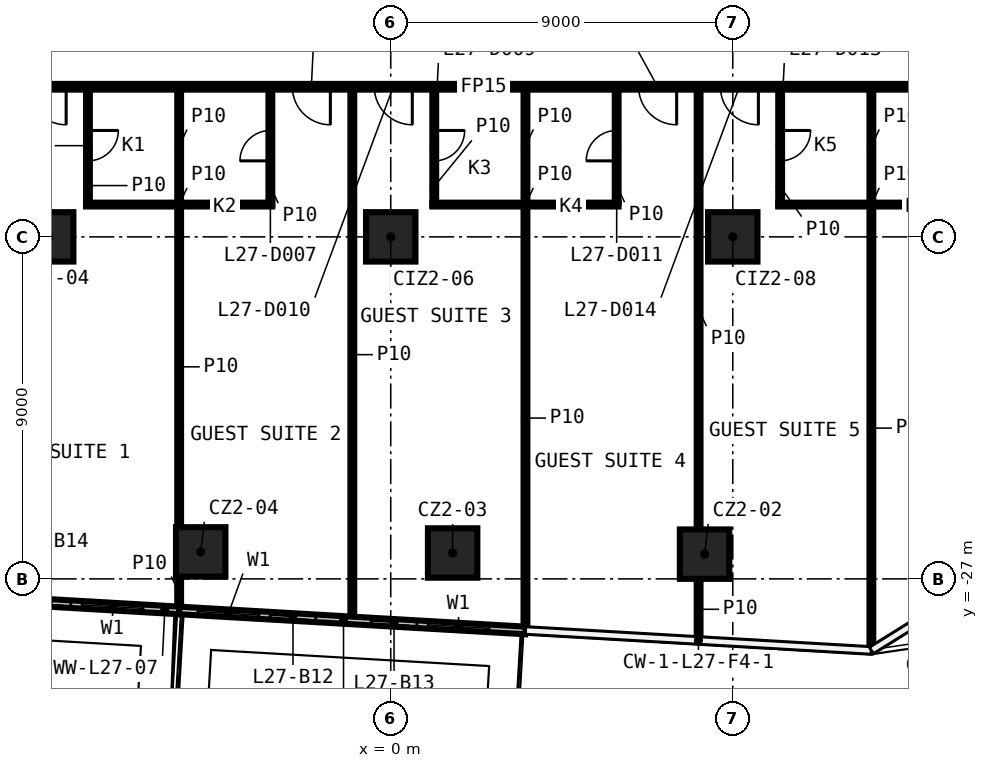
"""IFC4 building model, lengths in metres.
Left out: names, types, materials, properties, quantities, classifications, styles, units other than length and angle.
Written with IfcOpenShell. Run it as: python <this file> out.ifc"""

import sys

from ifc_helpers import new_model, si_unit, direction, frame, frame_2d, origin, origin_2d, place, context, subcontext, project, spatial, rectangle, extrude, element, fill, save


model = new_model("IFC4")
c1 = context("Model", 3, precision=1e-05, world=origin(), true_north=direction((0.0, 1.0)))
c2 = subcontext(c1, "Body", "Model", "MODEL_VIEW")
j1 = project(units=[si_unit("LENGTHUNIT", "METRE"), si_unit("PLANEANGLEUNIT", "RADIAN")], contexts=[c1])
p1 = place(None, origin())
s1 = spatial("IfcSite", under=j1, at=p1, CompositionType="ELEMENT")
p2 = place(p1, origin())
s2 = spatial("IfcBuilding", under=s1, at=p2, CompositionType="ELEMENT")
p3 = place(p2, frame((0.0, 0.0, 124.8)))
s3 = spatial("IfcBuildingStorey", under=s2, at=p3, CompositionType="ELEMENT", Elevation=124.8)
for number, where, z_axis, x_axis in (
    (1, (8.258, -26.349, 0.0), (0.0, 0.0, 1.0), (1.0, 0.0, 0.0)),
    (2, (1.629, -26.319, 0.0), (0.0, 0.0, 1.0), (1.0, 0.0, 0.0)),
    (3, (-5.0, -26.29, 0.0), (0.0, 0.0, 1.0), (1.0, 0.0, 0.0)),
    (4, (-9.0, -18.0, 0.0), (0.0, 0.0, 1.0), (1.0, 0.0, 0.0)),
    (5, (0.0, -18.0, 0.0), (0.0, 0.0, 1.0), (1.0, 0.0, 0.0)),
    (6, (9.0, -18.0, 0.0), (0.0, 0.0, 1.0), (1.0, 0.0, 0.0)),
):
    element("IfcColumn", number, at=place(p3, frame(where, z_axis=z_axis, x_axis=x_axis)), inside=s3, PredefinedType="COLUMN", context=c2, shape_type="SweptSolid", body=[
        extrude(rectangle(XDim=1.3, YDim=1.3, at=origin_2d()), origin(), (0.0, 0.0, 1.0), 3.3),
    ])
for number, where, z_axis, x_axis in (
    (7, (-8.017, -17.15, 0.0), (0.0, 0.0, 1.0), (1.0, 0.0, 0.0)),
    (8, (1.095, -17.15, 0.0), (0.0, 0.0, 1.0), (1.0, 0.0, 0.0)),
    (9, (10.197, -17.15, 0.0), (0.0, 0.0, 1.0), (1.0, 0.0, 0.0)),
):
    element("IfcWall", number, at=place(p3, frame(where, z_axis=z_axis, x_axis=x_axis)), inside=s3, PredefinedType="PARTITIONING", context=c2, shape_type="SweptSolid", body=[
        extrude(rectangle(XDim=4.9, YDim=0.1, at=frame_2d((2.45, 0.0))), origin(), (0.0, 0.0, 1.0), 3.3),
    ])
p4 = place(p3, frame((17.125, -14.05, 0.0), z_axis=(0.0, 0.0, 1.0), x_axis=(-1.0, 0.0, 0.0)))
e10 = element("IfcWall", 10, at=p4, inside=s3, PredefinedType="PARTITIONING", context=c2, shape_type="SweptSolid", body=[
    extrude(rectangle(XDim=34.25, YDim=0.15, at=frame_2d((17.125, 0.0))), origin(), (0.0, 0.0, 1.0), 3.3),
])
p5 = place(p4, frame((32.089, 0.0, 0.0)))
e11 = element("IfcOpeningElement", 11, at=p5, cuts=e10, PredefinedType="OPENING", context=c2, shape_type="SweptSolid", body=[
    extrude(rectangle(XDim=0.9, YDim=2.1, at=frame_2d((0.45, 1.05))), frame((0.0, 0.085, 0.0), z_axis=(0.0, -1.0, 0.0), x_axis=(1.0, 0.0, 0.0)), (0.0, 0.0, 1.0), 0.17),
])
p6 = place(p4, frame((25.666, 0.0, 0.0)))
e12 = element("IfcOpeningElement", 12, at=p6, cuts=e10, PredefinedType="OPENING", context=c2, shape_type="SweptSolid", body=[
    extrude(rectangle(XDim=1.0, YDim=2.1, at=frame_2d((0.5, 1.05))), frame((0.0, 0.085, 0.0), z_axis=(0.0, -1.0, 0.0), x_axis=(1.0, 0.0, 0.0)), (0.0, 0.0, 1.0), 0.17),
])
p7 = place(p4, frame((18.714, 0.0, 0.0)))
e13 = element("IfcOpeningElement", 13, at=p7, cuts=e10, PredefinedType="OPENING", context=c2, shape_type="SweptSolid", body=[
    extrude(rectangle(XDim=1.0, YDim=2.1, at=frame_2d((0.5, 1.05))), frame((0.0, 0.085, 0.0), z_axis=(0.0, -1.0, 0.0), x_axis=(1.0, 0.0, 0.0)), (0.0, 0.0, 1.0), 0.17),
])
p8 = place(p4, frame((16.558, 0.0, 0.0)))
e14 = element("IfcOpeningElement", 14, at=p8, cuts=e10, PredefinedType="OPENING", context=c2, shape_type="SweptSolid", body=[
    extrude(rectangle(XDim=1.0, YDim=2.1, at=frame_2d((0.5, 1.05))), frame((0.0, 0.085, 0.0), z_axis=(0.0, -1.0, 0.0), x_axis=(1.0, 0.0, 0.0)), (0.0, 0.0, 1.0), 0.17),
])
p9 = place(p4, frame((9.602, 0.0, 0.0)))
e15 = element("IfcOpeningElement", 15, at=p9, cuts=e10, PredefinedType="OPENING", context=c2, shape_type="SweptSolid", body=[
    extrude(rectangle(XDim=1.0, YDim=2.1, at=frame_2d((0.5, 1.05))), frame((0.0, 0.085, 0.0), z_axis=(0.0, -1.0, 0.0), x_axis=(1.0, 0.0, 0.0)), (0.0, 0.0, 1.0), 0.17),
])
p10 = place(p4, frame((7.451, 0.0, 0.0)))
e16 = element("IfcOpeningElement", 16, at=p10, cuts=e10, PredefinedType="OPENING", context=c2, shape_type="SweptSolid", body=[
    extrude(rectangle(XDim=1.0, YDim=2.1, at=frame_2d((0.5, 1.05))), frame((0.0, 0.085, 0.0), z_axis=(0.0, -1.0, 0.0), x_axis=(1.0, 0.0, 0.0)), (0.0, 0.0, 1.0), 0.17),
])
p11 = place(p4, frame((0.576, 0.0, 0.0)))
e17 = element("IfcOpeningElement", 17, at=p11, cuts=e10, PredefinedType="OPENING", context=c2, shape_type="SweptSolid", body=[
    extrude(rectangle(XDim=1.0, YDim=2.1, at=frame_2d((0.5, 1.05))), frame((0.0, 0.085, 0.0), z_axis=(0.0, -1.0, 0.0), x_axis=(1.0, 0.0, 0.0)), (0.0, 0.0, 1.0), 0.17),
])
p12 = place(p3, frame((12.647, -28.864, 0.0), z_axis=(0.0, 0.0, 1.0), x_axis=(0.0, 1.0, 0.0)))
e18 = element("IfcWall", 18, at=p12, inside=s3, PredefinedType="PARTITIONING", context=c2, shape_type="SweptSolid", body=[
    extrude(rectangle(XDim=11.664, YDim=0.1, at=frame_2d((5.832, 0.0))), origin(), (0.0, 0.0, 1.0), 3.3),
])
p13 = place(p3, frame((12.647, -17.1, 0.0), z_axis=(0.0, 0.0, 1.0), x_axis=(0.0, 1.0, 0.0)))
e19 = element("IfcWall", 19, at=p13, inside=s3, PredefinedType="PARTITIONING", context=c2, shape_type="SweptSolid", body=[
    extrude(rectangle(XDim=2.975, YDim=0.1, at=frame_2d((1.488, 0.0))), origin(), (0.0, 0.0, 1.0), 3.3),
])
p14 = place(p3, frame((10.247, -14.125, 0.0), z_axis=(0.0, 0.0, 1.0), x_axis=(0.0, -1.0, 0.0)))
e20 = element("IfcWall", 20, at=p14, inside=s3, PredefinedType="PARTITIONING", context=c2, shape_type="SweptSolid", body=[
    extrude(rectangle(XDim=3.025, YDim=0.1, at=frame_2d((1.512, 0.0))), origin(), (0.0, 0.0, 1.0), 3.3),
])
p15 = place(p14, frame((1.075, 0.0, 0.0)))
e21 = element("IfcOpeningElement", 21, at=p15, cuts=e20, PredefinedType="OPENING", context=c2, shape_type="SweptSolid", body=[
    extrude(rectangle(XDim=0.8, YDim=2.1, at=frame_2d((0.4, 1.05))), frame((0.0, 0.06, 0.0), z_axis=(0.0, -1.0, 0.0), x_axis=(1.0, 0.0, 0.0)), (0.0, 0.0, 1.0), 0.12),
])
p16 = place(p3, frame((8.101, -28.601, 0.0), z_axis=(0.0, 0.0, 1.0), x_axis=(0.0, 1.0, 0.0)))
e22 = element("IfcWall", 22, at=p16, inside=s3, PredefinedType="PARTITIONING", context=c2, shape_type="SweptSolid", body=[
    extrude(rectangle(XDim=1.602, YDim=0.1, at=frame_2d((0.801, 0.0))), origin(), (0.0, 0.0, 1.0), 3.3),
])
p17 = place(p3, frame((8.101, -25.699, 0.0), z_axis=(0.0, 0.0, 1.0), x_axis=(0.0, 1.0, 0.0)))
e23 = element("IfcWall", 23, at=p17, inside=s3, PredefinedType="PARTITIONING", context=c2, shape_type="SweptSolid", body=[
    extrude(rectangle(XDim=11.574, YDim=0.1, at=frame_2d((5.787, 0.0))), origin(), (0.0, 0.0, 1.0), 3.3),
])
p18 = place(p3, frame((5.945, -17.1, 0.0), z_axis=(0.0, 0.0, 1.0), x_axis=(0.0, 1.0, 0.0)))
e24 = element("IfcWall", 24, at=p18, inside=s3, PredefinedType="PARTITIONING", context=c2, shape_type="SweptSolid", body=[
    extrude(rectangle(XDim=2.975, YDim=0.1, at=frame_2d((1.488, 0.0))), origin(), (0.0, 0.0, 1.0), 3.3),
])
p19 = place(p18, frame((1.1, 0.0, 0.0)))
e25 = element("IfcOpeningElement", 25, at=p19, cuts=e24, PredefinedType="OPENING", context=c2, shape_type="SweptSolid", body=[
    extrude(rectangle(XDim=0.8, YDim=2.1, at=frame_2d((0.4, 1.05))), frame((0.0, 0.06, 0.0), z_axis=(0.0, -1.0, 0.0), x_axis=(1.0, 0.0, 0.0)), (0.0, 0.0, 1.0), 0.12),
])
p20 = place(p3, frame((3.545, -28.338, 0.0), z_axis=(0.0, 0.0, 1.0), x_axis=(0.0, 1.0, 0.0)))
e26 = element("IfcWall", 26, at=p20, inside=s3, PredefinedType="PARTITIONING", context=c2, shape_type="SweptSolid", body=[
    extrude(rectangle(XDim=11.138, YDim=0.1, at=frame_2d((5.569, 0.0))), origin(), (0.0, 0.0, 1.0), 3.3),
])
p21 = place(p3, frame((3.545, -17.1, 0.0), z_axis=(0.0, 0.0, 1.0), x_axis=(0.0, 1.0, 0.0)))
e27 = element("IfcWall", 27, at=p21, inside=s3, PredefinedType="PARTITIONING", context=c2, shape_type="SweptSolid", body=[
    extrude(rectangle(XDim=2.975, YDim=0.1, at=frame_2d((1.488, 0.0))), origin(), (0.0, 0.0, 1.0), 3.3),
])
p22 = place(p3, frame((1.145, -14.125, 0.0), z_axis=(0.0, 0.0, 1.0), x_axis=(0.0, -1.0, 0.0)))
e28 = element("IfcWall", 28, at=p22, inside=s3, PredefinedType="PARTITIONING", context=c2, shape_type="SweptSolid", body=[
    extrude(rectangle(XDim=3.025, YDim=0.1, at=frame_2d((1.512, 0.0))), origin(), (0.0, 0.0, 1.0), 3.3),
])
p23 = place(p22, frame((1.075, 0.0, 0.0)))
e29 = element("IfcOpeningElement", 29, at=p23, cuts=e28, PredefinedType="OPENING", context=c2, shape_type="SweptSolid", body=[
    extrude(rectangle(XDim=0.8, YDim=2.1, at=frame_2d((0.4, 1.05))), frame((0.0, 0.06, 0.0), z_axis=(0.0, -1.0, 0.0), x_axis=(1.0, 0.0, 0.0)), (0.0, 0.0, 1.0), 0.12),
])
p24 = place(p3, frame((-1.011, -28.074, 0.0), z_axis=(0.0, 0.0, 1.0), x_axis=(0.0, 1.0, 0.0)))
e30 = element("IfcWall", 30, at=p24, inside=s3, PredefinedType="PARTITIONING", context=c2, shape_type="SweptSolid", body=[
    extrude(rectangle(XDim=13.949, YDim=0.1, at=frame_2d((6.975, 0.0))), origin(), (0.0, 0.0, 1.0), 3.3),
])
p25 = place(p3, frame((-3.167, -17.15, 0.0), z_axis=(0.0, 0.0, 1.0), x_axis=(0.0, 1.0, 0.0)))
e31 = element("IfcWall", 31, at=p25, inside=s3, PredefinedType="PARTITIONING", context=c2, shape_type="SweptSolid", body=[
    extrude(rectangle(XDim=3.025, YDim=0.1, at=frame_2d((1.512, 0.0))), origin(), (0.0, 0.0, 1.0), 3.3),
])
p26 = place(p25, frame((1.15, 0.0, 0.0)))
e32 = element("IfcOpeningElement", 32, at=p26, cuts=e31, PredefinedType="OPENING", context=c2, shape_type="SweptSolid", body=[
    extrude(rectangle(XDim=0.8, YDim=2.1, at=frame_2d((0.4, 1.05))), frame((0.0, 0.06, 0.0), z_axis=(0.0, -1.0, 0.0), x_axis=(1.0, 0.0, 0.0)), (0.0, 0.0, 1.0), 0.12),
])
p27 = place(p3, frame((-5.567, -27.811, 0.0), z_axis=(0.0, 0.0, 1.0), x_axis=(0.0, 1.0, 0.0)))
e33 = element("IfcWall", 33, at=p27, inside=s3, PredefinedType="PARTITIONING", context=c2, shape_type="SweptSolid", body=[
    extrude(rectangle(XDim=0.871, YDim=0.1, at=frame_2d((0.435, 0.0))), origin(), (0.0, 0.0, 1.0), 3.3),
])
p28 = place(p3, frame((-5.567, -25.64, 0.0), z_axis=(0.0, 0.0, 1.0), x_axis=(0.0, 1.0, 0.0)))
e34 = element("IfcWall", 34, at=p28, inside=s3, PredefinedType="PARTITIONING", context=c2, shape_type="SweptSolid", body=[
    extrude(rectangle(XDim=8.44, YDim=0.1, at=frame_2d((4.22, 0.0))), origin(), (0.0, 0.0, 1.0), 3.3),
])
p29 = place(p3, frame((-5.567, -17.1, 0.0), z_axis=(0.0, 0.0, 1.0), x_axis=(0.0, 1.0, 0.0)))
e35 = element("IfcWall", 35, at=p29, inside=s3, PredefinedType="PARTITIONING", context=c2, shape_type="SweptSolid", body=[
    extrude(rectangle(XDim=2.975, YDim=0.1, at=frame_2d((1.488, 0.0))), origin(), (0.0, 0.0, 1.0), 3.3),
])
p30 = place(p3, frame((-7.967, -14.125, 0.0), z_axis=(0.0, 0.0, 1.0), x_axis=(0.0, -1.0, 0.0)))
e36 = element("IfcWall", 36, at=p30, inside=s3, PredefinedType="PARTITIONING", context=c2, shape_type="SweptSolid", body=[
    extrude(rectangle(XDim=2.975, YDim=0.1, at=frame_2d((1.488, 0.0))), origin(), (0.0, 0.0, 1.0), 3.3),
])
p31 = place(p30, frame((1.075, 0.0, 0.0)))
e37 = element("IfcOpeningElement", 37, at=p31, cuts=e36, PredefinedType="OPENING", context=c2, shape_type="SweptSolid", body=[
    extrude(rectangle(XDim=0.8, YDim=2.1, at=frame_2d((0.4, 1.05))), frame((0.0, 0.06, 0.0), z_axis=(0.0, -1.0, 0.0), x_axis=(1.0, 0.0, 0.0)), (0.0, 0.0, 1.0), 0.12),
])
p32 = place(p3, frame((-5.567, -27.831, 0.0), z_axis=(0.0, 0.0, 1.0), x_axis=(0.998331175274, -0.057748285484, 0.0)))
e38 = element("IfcWall", 38, at=p32, inside=s3, PredefinedType="SOLIDWALL", context=c2, shape_type="SweptSolid", body=[
    extrude(rectangle(XDim=9.127, YDim=0.2, at=frame_2d((4.564, 0.0))), origin(), (0.0, 0.0, 1.0), 3.3),
])
p33 = place(p32, frame((0.5, 0.0, 0.6)))
e39 = element("IfcOpeningElement", 39, at=p33, cuts=e38, PredefinedType="OPENING", context=c2, shape_type="SweptSolid", body=[
    extrude(rectangle(XDim=1.6, YDim=2.4, at=frame_2d((0.8, 1.2))), frame((0.0, 0.11, 0.0), z_axis=(0.0, -1.0, 0.0), x_axis=(1.0, 0.0, 0.0)), (0.0, 0.0, 1.0), 0.22),
])
p34 = place(p32, frame((2.4, 0.0, 0.0)))
e40 = element("IfcOpeningElement", 40, at=p34, cuts=e38, PredefinedType="OPENING", context=c2, shape_type="SweptSolid", body=[
    extrude(rectangle(XDim=1.2, YDim=2.4, at=frame_2d((0.6, 1.2))), frame((0.0, 0.11, 0.0), z_axis=(0.0, -1.0, 0.0), x_axis=(1.0, 0.0, 0.0)), (0.0, 0.0, 1.0), 0.22),
])
p35 = place(p32, frame((6.564, 0.0, 0.6)))
e41 = element("IfcOpeningElement", 41, at=p35, cuts=e38, PredefinedType="OPENING", context=c2, shape_type="SweptSolid", body=[
    extrude(rectangle(XDim=1.6, YDim=2.4, at=frame_2d((0.8, 1.2))), frame((0.0, 0.11, 0.0), z_axis=(0.0, -1.0, 0.0), x_axis=(1.0, 0.0, 0.0)), (0.0, 0.0, 1.0), 0.22),
])
p36 = place(p32, frame((5.064, 0.0, 0.0)))
e42 = element("IfcOpeningElement", 42, at=p36, cuts=e38, PredefinedType="OPENING", context=c2, shape_type="SweptSolid", body=[
    extrude(rectangle(XDim=1.2, YDim=2.4, at=frame_2d((0.6, 1.2))), frame((0.0, 0.11, 0.0), z_axis=(0.0, -1.0, 0.0), x_axis=(1.0, 0.0, 0.0)), (0.0, 0.0, 1.0), 0.22),
])
p37 = place(p3, frame((-10.115, -27.568, 0.0), z_axis=(0.0, 0.0, 1.0), x_axis=(0.998332643992, -0.057722889224, 0.0)))
e43 = element("IfcWall", 43, at=p37, inside=s3, PredefinedType="SOLIDWALL", context=c2, shape_type="SweptSolid", body=[
    extrude(rectangle(XDim=4.555, YDim=0.2, at=frame_2d((2.278, 0.0))), origin(), (0.0, 0.0, 1.0), 3.3),
])
p38 = place(p37, frame((2.0, 0.0, 0.6)))
e44 = element("IfcOpeningElement", 44, at=p38, cuts=e43, PredefinedType="OPENING", context=c2, shape_type="SweptSolid", body=[
    extrude(rectangle(XDim=1.6, YDim=2.4, at=frame_2d((0.8, 1.2))), frame((0.0, 0.11, 0.0), z_axis=(0.0, -1.0, 0.0), x_axis=(1.0, 0.0, 0.0)), (0.0, 0.0, 1.0), 0.22),
])
p39 = place(p37, frame((0.5, 0.0, 0.0)))
e45 = element("IfcOpeningElement", 45, at=p39, cuts=e43, PredefinedType="OPENING", context=c2, shape_type="SweptSolid", body=[
    extrude(rectangle(XDim=1.2, YDim=2.4, at=frame_2d((0.6, 1.2))), frame((0.0, 0.11, 0.0), z_axis=(0.0, -1.0, 0.0), x_axis=(1.0, 0.0, 0.0)), (0.0, 0.0, 1.0), 0.22),
])
p40 = place(p31, origin())
e46 = element("IfcDoor", 46, at=p40, inside=s3, OperationType="SINGLE_SWING_RIGHT", PredefinedType="DOOR", context=c2, shape_type="SweptSolid", body=[
    extrude(rectangle(XDim=0.8, YDim=2.1, at=frame_2d((0.4, 1.05))), frame((0.0, 0.025, 0.0), z_axis=(0.0, -1.0, 0.0), x_axis=(1.0, 0.0, 0.0)), (0.0, 0.0, 1.0), 0.05),
])
fill(e37, e46)
p41 = place(p6, origin())
e47 = element("IfcDoor", 47, at=p41, inside=s3, OperationType="SINGLE_SWING_LEFT", PredefinedType="DOOR", context=c2, shape_type="SweptSolid", body=[
    extrude(rectangle(XDim=1.0, YDim=2.1, at=frame_2d((0.5, 1.05))), frame((0.0, 0.025, 0.0), z_axis=(0.0, -1.0, 0.0), x_axis=(1.0, 0.0, 0.0)), (0.0, 0.0, 1.0), 0.05),
])
fill(e12, e47)
p42 = place(p26, origin())
e48 = element("IfcDoor", 48, at=p42, inside=s3, OperationType="SINGLE_SWING_LEFT", PredefinedType="DOOR", context=c2, shape_type="SweptSolid", body=[
    extrude(rectangle(XDim=0.8, YDim=2.1, at=frame_2d((0.4, 1.05))), frame((0.0, 0.025, 0.0), z_axis=(0.0, -1.0, 0.0), x_axis=(1.0, 0.0, 0.0)), (0.0, 0.0, 1.0), 0.05),
])
fill(e32, e48)
p43 = place(p7, origin())
e49 = element("IfcDoor", 49, at=p43, inside=s3, OperationType="SINGLE_SWING_RIGHT", PredefinedType="DOOR", context=c2, shape_type="SweptSolid", body=[
    extrude(rectangle(XDim=1.0, YDim=2.1, at=frame_2d((0.5, 1.05))), frame((0.0, 0.025, 0.0), z_axis=(0.0, -1.0, 0.0), x_axis=(1.0, 0.0, 0.0)), (0.0, 0.0, 1.0), 0.05),
])
fill(e13, e49)
p44 = place(p23, origin())
e50 = element("IfcDoor", 50, at=p44, inside=s3, OperationType="SINGLE_SWING_RIGHT", PredefinedType="DOOR", context=c2, shape_type="SweptSolid", body=[
    extrude(rectangle(XDim=0.8, YDim=2.1, at=frame_2d((0.4, 1.05))), frame((0.0, 0.025, 0.0), z_axis=(0.0, -1.0, 0.0), x_axis=(1.0, 0.0, 0.0)), (0.0, 0.0, 1.0), 0.05),
])
fill(e29, e50)
p45 = place(p8, origin())
e51 = element("IfcDoor", 51, at=p45, inside=s3, OperationType="SINGLE_SWING_LEFT", PredefinedType="DOOR", context=c2, shape_type="SweptSolid", body=[
    extrude(rectangle(XDim=1.0, YDim=2.1, at=frame_2d((0.5, 1.05))), frame((0.0, 0.025, 0.0), z_axis=(0.0, -1.0, 0.0), x_axis=(1.0, 0.0, 0.0)), (0.0, 0.0, 1.0), 0.05),
])
fill(e14, e51)
p46 = place(p19, origin())
e52 = element("IfcDoor", 52, at=p46, inside=s3, OperationType="SINGLE_SWING_LEFT", PredefinedType="DOOR", context=c2, shape_type="SweptSolid", body=[
    extrude(rectangle(XDim=0.8, YDim=2.1, at=frame_2d((0.4, 1.05))), frame((0.0, 0.025, 0.0), z_axis=(0.0, -1.0, 0.0), x_axis=(1.0, 0.0, 0.0)), (0.0, 0.0, 1.0), 0.05),
])
fill(e25, e52)
p47 = place(p9, origin())
e53 = element("IfcDoor", 53, at=p47, inside=s3, OperationType="SINGLE_SWING_RIGHT", PredefinedType="DOOR", context=c2, shape_type="SweptSolid", body=[
    extrude(rectangle(XDim=1.0, YDim=2.1, at=frame_2d((0.5, 1.05))), frame((0.0, 0.025, 0.0), z_axis=(0.0, -1.0, 0.0), x_axis=(1.0, 0.0, 0.0)), (0.0, 0.0, 1.0), 0.05),
])
fill(e15, e53)
p48 = place(p15, origin())
e54 = element("IfcDoor", 54, at=p48, inside=s3, OperationType="SINGLE_SWING_RIGHT", PredefinedType="DOOR", context=c2, shape_type="SweptSolid", body=[
    extrude(rectangle(XDim=0.8, YDim=2.1, at=frame_2d((0.4, 1.05))), frame((0.0, 0.025, 0.0), z_axis=(0.0, -1.0, 0.0), x_axis=(1.0, 0.0, 0.0)), (0.0, 0.0, 1.0), 0.05),
])
fill(e21, e54)
p49 = place(p10, origin())
e55 = element("IfcDoor", 55, at=p49, inside=s3, OperationType="SINGLE_SWING_LEFT", PredefinedType="DOOR", context=c2, shape_type="SweptSolid", body=[
    extrude(rectangle(XDim=1.0, YDim=2.1, at=frame_2d((0.5, 1.05))), frame((0.0, 0.025, 0.0), z_axis=(0.0, -1.0, 0.0), x_axis=(1.0, 0.0, 0.0)), (0.0, 0.0, 1.0), 0.05),
])
fill(e16, e55)
p50 = place(p33, origin())
e56 = element("IfcWindow", 56, at=p50, inside=s3, PartitioningType="SINGLE_PANEL", PredefinedType="WINDOW", context=c2, shape_type="SweptSolid", body=[
    extrude(rectangle(XDim=1.6, YDim=2.4, at=frame_2d((0.8, 1.2))), frame((0.0, 0.03, 0.0), z_axis=(0.0, -1.0, 0.0), x_axis=(1.0, 0.0, 0.0)), (0.0, 0.0, 1.0), 0.06),
])
fill(e39, e56)
p51 = place(p34, origin())
e57 = element("IfcDoor", 57, at=p51, inside=s3, OperationType="SLIDING_TO_LEFT", PredefinedType="DOOR", context=c2, shape_type="SweptSolid", body=[
    extrude(rectangle(XDim=1.2, YDim=2.4, at=frame_2d((0.6, 1.2))), frame((0.0, 0.025, 0.0), z_axis=(0.0, -1.0, 0.0), x_axis=(1.0, 0.0, 0.0)), (0.0, 0.0, 1.0), 0.05),
])
fill(e40, e57)
p52 = place(p35, origin())
e58 = element("IfcWindow", 58, at=p52, inside=s3, PartitioningType="SINGLE_PANEL", PredefinedType="WINDOW", context=c2, shape_type="SweptSolid", body=[
    extrude(rectangle(XDim=1.6, YDim=2.4, at=frame_2d((0.8, 1.2))), frame((0.0, 0.03, 0.0), z_axis=(0.0, -1.0, 0.0), x_axis=(1.0, 0.0, 0.0)), (0.0, 0.0, 1.0), 0.06),
])
fill(e41, e58)
p53 = place(p36, origin())
e59 = element("IfcDoor", 59, at=p53, inside=s3, OperationType="SLIDING_TO_LEFT", PredefinedType="DOOR", context=c2, shape_type="SweptSolid", body=[
    extrude(rectangle(XDim=1.2, YDim=2.4, at=frame_2d((0.6, 1.2))), frame((0.0, 0.025, 0.0), z_axis=(0.0, -1.0, 0.0), x_axis=(1.0, 0.0, 0.0)), (0.0, 0.0, 1.0), 0.05),
])
fill(e42, e59)
p54 = place(p38, origin())
e60 = element("IfcWindow", 60, at=p54, inside=s3, PartitioningType="SINGLE_PANEL", PredefinedType="WINDOW", context=c2, shape_type="SweptSolid", body=[
    extrude(rectangle(XDim=1.6, YDim=2.4, at=frame_2d((0.8, 1.2))), frame((0.0, 0.03, 0.0), z_axis=(0.0, -1.0, 0.0), x_axis=(1.0, 0.0, 0.0)), (0.0, 0.0, 1.0), 0.06),
])
fill(e44, e60)
p55 = place(p39, origin())
e61 = element("IfcDoor", 61, at=p55, inside=s3, OperationType="SLIDING_TO_LEFT", PredefinedType="DOOR", context=c2, shape_type="SweptSolid", body=[
    extrude(rectangle(XDim=1.2, YDim=2.4, at=frame_2d((0.6, 1.2))), frame((0.0, 0.025, 0.0), z_axis=(0.0, -1.0, 0.0), x_axis=(1.0, 0.0, 0.0)), (0.0, 0.0, 1.0), 0.05),
])
fill(e45, e61)
save(model, sys.argv[1])
